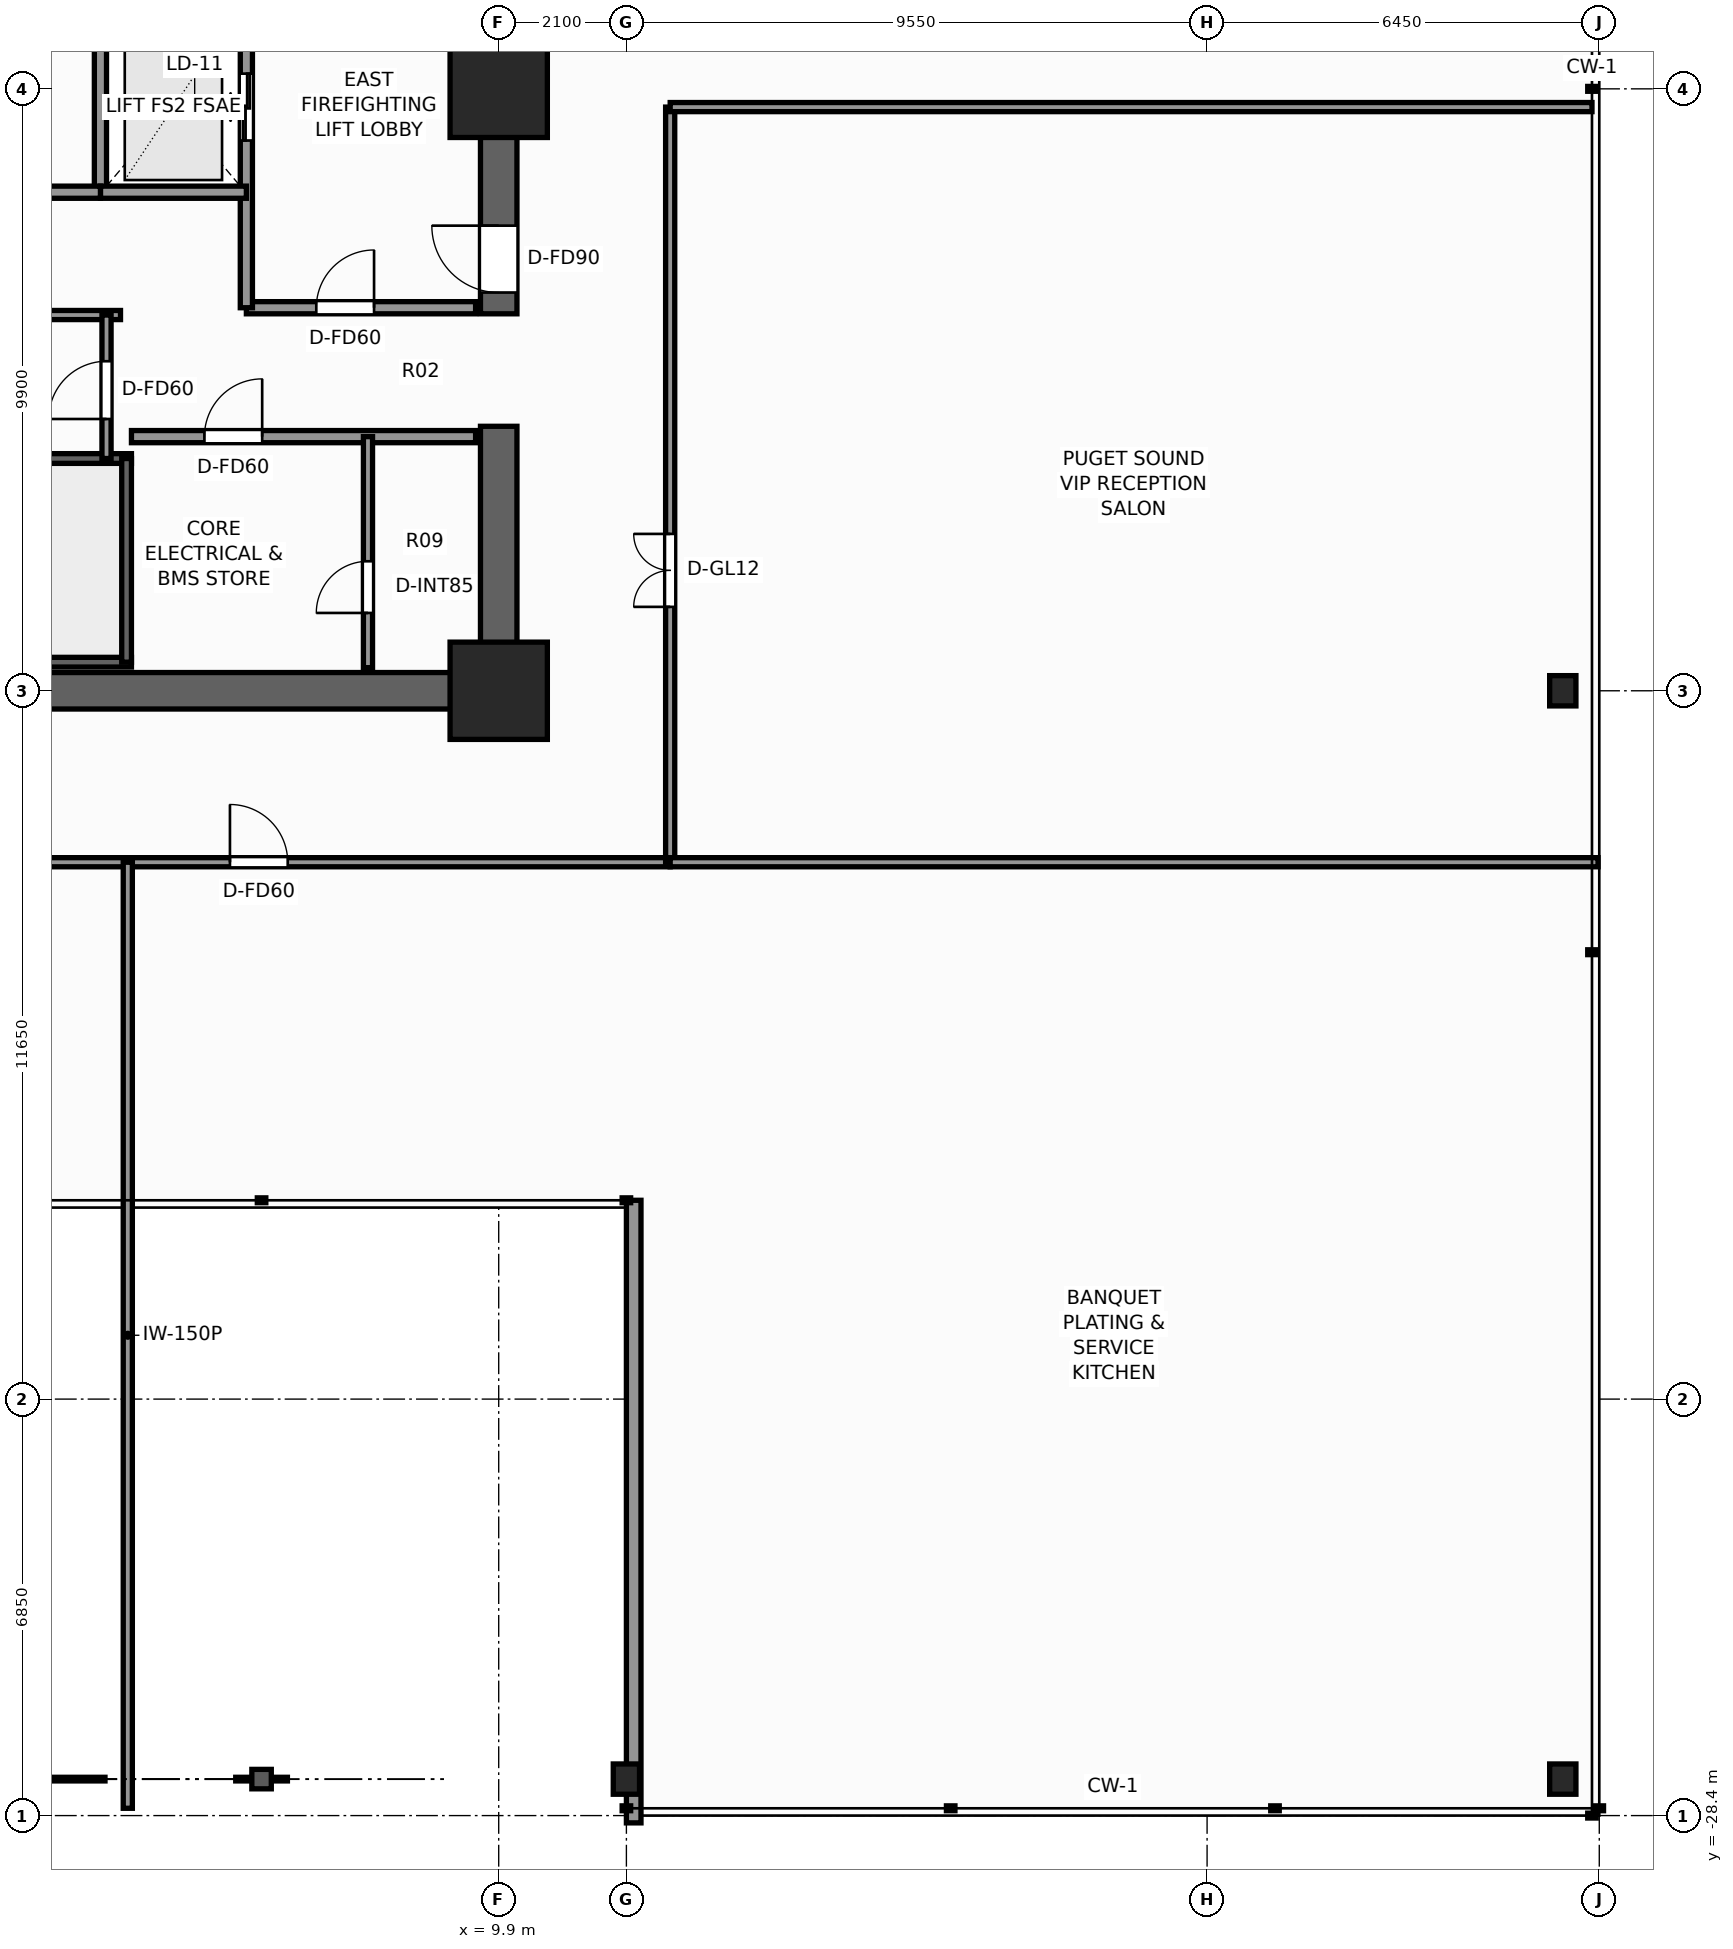
"""IFC4 building model, lengths in metres.
Left out: names, types, materials, properties, quantities, classifications, styles, units other than length and angle.
Written with IfcOpenShell. Run it as: python <this file> out.ifc"""

import sys

from ifc_helpers import new_model, si_unit, direction, frame, frame_2d, origin, origin_2d, place, context, subcontext, project, spatial, rectangle, i_section, extrude, element, fill, save


model = new_model("IFC4")
c1 = context("Model", 3, precision=1e-05, world=origin(), true_north=direction((0.0, 1.0)))
c2 = subcontext(c1, "Body", "Model", "MODEL_VIEW")
j1 = project(units=[si_unit("LENGTHUNIT", "METRE"), si_unit("PLANEANGLEUNIT", "RADIAN")], contexts=[c1])
p1 = place(None, origin())
s1 = spatial("IfcSite", under=j1, at=p1, CompositionType="ELEMENT")
p2 = place(p1, origin())
s2 = spatial("IfcBuilding", under=s1, at=p2, CompositionType="ELEMENT")
p3 = place(p2, frame((0.0, 0.0, 10.0)))
s3 = spatial("IfcBuildingStorey", under=s2, at=p3, CompositionType="ELEMENT", Elevation=10.0)
p4 = place(p3, frame((10.2, -9.9, 0.0), z_axis=(0.0, 0.0, 1.0), x_axis=(-1.0, 0.0, 0.0)))
e1 = element("IfcWall", 1, at=p4, inside=s3, PredefinedType="SHEAR", context=c2, shape_type="SweptSolid", body=[
    extrude(rectangle(XDim=12.06, YDim=0.6, at=frame_2d((6.03, 0.0))), origin(), (0.0, 0.0, 1.0), 5.2),
])
p5 = place(p3, frame((9.9, -9.6, 0.0), z_axis=(0.0, 0.0, 1.0), x_axis=(0.0, 1.0, 0.0)))
e2 = element("IfcWall", 2, at=p5, inside=s3, PredefinedType="SHEAR", context=c2, shape_type="SweptSolid", body=[
    extrude(rectangle(XDim=4.05, YDim=0.6, at=frame_2d((2.025, 0.0))), origin(), (0.0, 0.0, 1.0), 5.2),
])
p6 = place(p3, frame((9.9, -3.7, 0.0), z_axis=(0.0, 0.0, 1.0), x_axis=(0.0, 1.0, 0.0)))
e3 = element("IfcWall", 3, at=p6, inside=s3, PredefinedType="SHEAR", context=c2, shape_type="SweptSolid", body=[
    extrude(rectangle(XDim=13.3, YDim=0.6, at=frame_2d((6.65, 0.0))), origin(), (0.0, 0.0, 1.0), 5.2),
])
p7 = place(p6, frame((0.35, 0.0, 0.0)))
e4 = element("IfcOpeningElement", 4, at=p7, cuts=e3, PredefinedType="OPENING", context=c2, shape_type="SweptSolid", body=[
    extrude(rectangle(XDim=1.1, YDim=2.2, at=frame_2d((0.55, 1.1))), frame((0.0, 0.31, 0.0), z_axis=(0.0, -1.0, 0.0), x_axis=(1.0, 0.0, 0.0)), (0.0, 0.0, 1.0), 0.62),
])
for number, where, z_axis, x_axis in (
    (5, (9.9, -9.9, 0.0), (0.0, 0.0, 1.0), (1.0, 0.0, 0.0)),
    (6, (9.9, 0.0, 0.0), (0.0, 0.0, 1.0), (1.0, 0.0, 0.0)),
):
    element("IfcColumn", number, at=place(p3, frame(where, z_axis=z_axis, x_axis=x_axis)), inside=s3, PredefinedType="COLUMN", context=c2, shape_type="SweptSolid", body=[
        extrude(rectangle(XDim=1.6, YDim=1.6, at=origin_2d()), origin(), (0.0, 0.0, 1.0), 5.2),
    ])
for number, where, z_axis, x_axis in (
    (7, (12.0, -27.8, 0.0), (0.0, 0.0, 1.0), (1.0, 0.0, 0.0)),
    (8, (27.4, -27.8, 0.0), (0.0, 0.0, 1.0), (1.0, 0.0, 0.0)),
    (9, (27.4, -9.9, 0.0), (0.0, 0.0, 1.0), (1.0, 0.0, 0.0)),
):
    element("IfcColumn", number, at=place(p3, frame(where, z_axis=z_axis, x_axis=x_axis)), inside=s3, PredefinedType="COLUMN", context=c2, shape_type="SweptSolid", body=[
        extrude(i_section(OverallWidth=0.432, OverallDepth=0.498, WebThickness=0.056, FlangeThickness=0.089, FilletRadius=0.025, at=origin_2d()), origin(), (0.0, 0.0, 1.0), 5.2),
    ])
p8 = place(p3, frame((12.12, -28.52, 0.0), z_axis=(0.0, 0.0, 1.0), x_axis=(0.0, 1.0, 0.0)))
e10 = element("IfcWall", 10, at=p8, inside=s3, PredefinedType="STANDARD", context=c2, shape_type="SweptSolid", body=[
    extrude(rectangle(XDim=10.24, YDim=0.24, at=frame_2d((5.12, 0.0))), origin(), (0.0, 0.0, 1.0), 3.904),
])
p9 = place(p3, frame((3.86, -9.43, 0.0), z_axis=(0.0, 0.0, 1.0), x_axis=(-1.0, 0.0, 0.0)))
e11 = element("IfcWall", 11, at=p9, inside=s3, PredefinedType="SHEAR", context=c2, shape_type="SweptSolid", body=[
    extrude(rectangle(XDim=7.72, YDim=0.16, at=frame_2d((3.86, 0.0))), origin(), (0.0, 0.0, 1.0), 5.2),
])
p10 = place(p9, frame((6.01, 0.0, 0.0)))
e12 = element("IfcOpeningElement", 12, at=p10, cuts=e11, PredefinedType="OPENING", context=c2, shape_type="SweptSolid", body=[
    extrude(rectangle(XDim=1.1, YDim=2.2, at=frame_2d((0.55, 1.1))), frame((0.0, 0.09, 0.0), z_axis=(0.0, -1.0, 0.0), x_axis=(1.0, 0.0, 0.0)), (0.0, 0.0, 1.0), 0.18),
])
p11 = place(p3, frame((-3.86, -6.08, 0.0), z_axis=(0.0, 0.0, 1.0), x_axis=(1.0, 0.0, 0.0)))
e13 = element("IfcWall", 13, at=p11, inside=s3, PredefinedType="SHEAR", context=c2, shape_type="SweptSolid", body=[
    extrude(rectangle(XDim=7.72, YDim=0.16, at=frame_2d((3.86, 0.0))), origin(), (0.0, 0.0, 1.0), 5.2),
])
p12 = place(p3, frame((3.78, -9.43, 0.0), z_axis=(0.0, 0.0, 1.0), x_axis=(0.0, 1.0, 0.0)))
e14 = element("IfcWall", 14, at=p12, inside=s3, PredefinedType="SHEAR", context=c2, shape_type="SweptSolid", body=[
    extrude(rectangle(XDim=3.35, YDim=0.16, at=frame_2d((1.675, 0.0))), origin(), (0.0, 0.0, 1.0), 5.2),
])
p13 = place(p3, frame((5.75, -3.6, 0.0), z_axis=(0.0, 0.0, 1.0), x_axis=(1.0, 0.0, 0.0)))
e15 = element("IfcWall", 15, at=p13, inside=s3, PredefinedType="SOLIDWALL", context=c2, shape_type="SweptSolid", body=[
    extrude(rectangle(XDim=3.77, YDim=0.2, at=frame_2d((1.885, 0.0))), origin(), (0.0, 0.0, 1.0), 4.92),
])
p14 = place(p13, frame((1.15, 0.0, 0.0)))
e16 = element("IfcOpeningElement", 16, at=p14, cuts=e15, PredefinedType="OPENING", context=c2, shape_type="SweptSolid", body=[
    extrude(rectangle(XDim=0.95, YDim=2.06, at=frame_2d((0.475, 1.03))), frame((0.0, 0.11, 0.0), z_axis=(0.0, -1.0, 0.0), x_axis=(1.0, 0.0, 0.0)), (0.0, 0.0, 1.0), 0.22),
])
p15 = place(p3, frame((5.75, -3.6, 0.0), z_axis=(0.0, 0.0, 1.0), x_axis=(0.0, 1.0, 0.0)))
e17 = element("IfcWall", 17, at=p15, inside=s3, PredefinedType="SOLIDWALL", context=c2, shape_type="SweptSolid", body=[
    extrude(rectangle(XDim=5.57, YDim=0.2, at=frame_2d((2.785, 0.0))), origin(), (0.0, 0.0, 1.0), 4.92),
])
p16 = place(p15, frame((2.75, 0.0, 0.0)))
e18 = element("IfcOpeningElement", 18, at=p16, cuts=e17, PredefinedType="OPENING", context=c2, shape_type="SweptSolid", body=[
    extrude(rectangle(XDim=1.1, YDim=2.2, at=frame_2d((0.55, 1.1))), frame((0.0, 0.11, 0.0), z_axis=(0.0, -1.0, 0.0), x_axis=(1.0, 0.0, 0.0)), (0.0, 0.0, 1.0), 0.22),
])
p17 = place(p3, frame((3.35, -1.7, 0.0), z_axis=(0.0, 0.0, 1.0), x_axis=(0.0, 1.0, 0.0)))
e19 = element("IfcWall", 19, at=p17, inside=s3, PredefinedType="SOLIDWALL", context=c2, shape_type="SweptSolid", body=[
    extrude(rectangle(XDim=2.8, YDim=0.2, at=frame_2d((1.4, 0.0))), origin(), (0.0, 0.0, 1.0), 4.92),
])
p18 = place(p3, frame((3.35, -1.7, 0.0), z_axis=(0.0, 0.0, 1.0), x_axis=(1.0, 0.0, 0.0)))
e20 = element("IfcWall", 20, at=p18, inside=s3, PredefinedType="SOLIDWALL", context=c2, shape_type="SweptSolid", body=[
    extrude(rectangle(XDim=2.4, YDim=0.2, at=frame_2d((1.2, 0.0))), origin(), (0.0, 0.0, 1.0), 4.92),
])
p19 = place(p3, frame((3.86, -5.72, 0.0), z_axis=(0.0, 0.0, 1.0), x_axis=(1.0, 0.0, 0.0)))
e21 = element("IfcWall", 21, at=p19, inside=s3, PredefinedType="SOLIDWALL", context=c2, shape_type="SweptSolid", body=[
    extrude(rectangle(XDim=5.66, YDim=0.2, at=frame_2d((2.83, 0.0))), origin(), (0.0, 0.0, 1.0), 4.92),
])
p20 = place(p19, frame((1.2, 0.0, 0.0)))
e22 = element("IfcOpeningElement", 22, at=p20, cuts=e21, PredefinedType="OPENING", context=c2, shape_type="SweptSolid", body=[
    extrude(rectangle(XDim=0.95, YDim=2.06, at=frame_2d((0.475, 1.03))), frame((0.0, 0.11, 0.0), z_axis=(0.0, -1.0, 0.0), x_axis=(1.0, 0.0, 0.0)), (0.0, 0.0, 1.0), 0.22),
])
p21 = place(p3, frame((7.75, -9.52, 0.0), z_axis=(0.0, 0.0, 1.0), x_axis=(0.0, 1.0, 0.0)))
e23 = element("IfcWall", 23, at=p21, inside=s3, PredefinedType="PARTITIONING", context=c2, shape_type="SweptSolid", body=[
    extrude(rectangle(XDim=3.8, YDim=0.15, at=frame_2d((1.9, 0.0))), origin(), (0.0, 0.0, 1.0), 4.92),
])
p22 = place(p21, frame((0.9, 0.0, 0.0)))
e24 = element("IfcOpeningElement", 24, at=p22, cuts=e23, PredefinedType="OPENING", context=c2, shape_type="SweptSolid", body=[
    extrude(rectangle(XDim=0.85, YDim=2.03, at=frame_2d((0.425, 1.015))), frame((0.0, 0.085, 0.0), z_axis=(0.0, -1.0, 0.0), x_axis=(1.0, 0.0, 0.0)), (0.0, 0.0, 1.0), 0.17),
])
p23 = place(p3, frame((-3.35, -1.7, 0.0), z_axis=(0.0, 0.0, 1.0), x_axis=(1.0, 0.0, 0.0)))
e25 = element("IfcWall", 25, at=p23, inside=s3, PredefinedType="SOLIDWALL", context=c2, shape_type="SweptSolid", body=[
    extrude(rectangle(XDim=6.7, YDim=0.2, at=frame_2d((3.35, 0.0))), origin(), (0.0, 0.0, 1.0), 4.92),
])
p24 = place(p3, frame((-3.68, -3.72, 0.0), z_axis=(0.0, 0.0, 1.0), x_axis=(1.0, 0.0, 0.0)))
e26 = element("IfcWall", 26, at=p24, inside=s3, PredefinedType="PARTITIONING", context=c2, shape_type="SweptSolid", body=[
    extrude(rectangle(XDim=7.36, YDim=0.15, at=frame_2d((3.68, 0.0))), origin(), (0.0, 0.0, 1.0), 4.92),
])
p25 = place(p3, frame((3.45, -6.08, 0.0), z_axis=(0.0, 0.0, 1.0), x_axis=(0.0, 1.0, 0.0)))
e27 = element("IfcWall", 27, at=p25, inside=s3, PredefinedType="PARTITIONING", context=c2, shape_type="SweptSolid", body=[
    extrude(rectangle(XDim=2.36, YDim=0.15, at=frame_2d((1.18, 0.0))), origin(), (0.0, 0.0, 1.0), 4.92),
])
p26 = place(p25, frame((0.65, 0.0, 0.0)))
e28 = element("IfcOpeningElement", 28, at=p26, cuts=e27, PredefinedType="OPENING", context=c2, shape_type="SweptSolid", body=[
    extrude(rectangle(XDim=0.95, YDim=2.06, at=frame_2d((0.475, 1.03))), frame((0.0, 0.085, 0.0), z_axis=(0.0, -1.0, 0.0), x_axis=(1.0, 0.0, 0.0)), (0.0, 0.0, 1.0), 0.17),
])
p27 = place(p3, frame((-12.72, -12.72, 0.0), z_axis=(0.0, 0.0, 1.0), x_axis=(1.0, 0.0, 0.0)))
e29 = element("IfcWall", 29, at=p27, inside=s3, PredefinedType="PARTITIONING", context=c2, shape_type="SweptSolid", body=[
    extrude(rectangle(XDim=25.44, YDim=0.15, at=frame_2d((12.72, 0.0))), origin(), (0.0, 0.0, 1.0), 3.894),
])
p28 = place(p27, frame((4.2, 0.0, 0.0)))
e30 = element("IfcOpeningElement", 30, at=p28, cuts=e29, PredefinedType="OPENING", context=c2, shape_type="SweptSolid", body=[
    extrude(rectangle(XDim=1.6, YDim=2.3, at=frame_2d((0.8, 1.15))), frame((0.0, 0.085, 0.0), z_axis=(0.0, -1.0, 0.0), x_axis=(1.0, 0.0, 0.0)), (0.0, 0.0, 1.0), 0.17),
])
p29 = place(p27, frame((18.2, 0.0, 0.0)))
e31 = element("IfcOpeningElement", 31, at=p29, cuts=e29, PredefinedType="OPENING", context=c2, shape_type="SweptSolid", body=[
    extrude(rectangle(XDim=0.95, YDim=2.06, at=frame_2d((0.475, 1.03))), frame((0.0, 0.085, 0.0), z_axis=(0.0, -1.0, 0.0), x_axis=(1.0, 0.0, 0.0)), (0.0, 0.0, 1.0), 0.17),
])
p30 = place(p3, frame((12.72, -12.72, 0.0), z_axis=(0.0, 0.0, 1.0), x_axis=(0.0, 1.0, 0.0)))
e32 = element("IfcWall", 32, at=p30, inside=s3, PredefinedType="PARTITIONING", context=c2, shape_type="SweptSolid", body=[
    extrude(rectangle(XDim=12.42, YDim=0.15, at=frame_2d((6.21, 0.0))), origin(), (0.0, 0.0, 1.0), 3.894),
])
p31 = place(p30, frame((4.2, 0.0, 0.0)))
e33 = element("IfcOpeningElement", 33, at=p31, cuts=e32, PredefinedType="OPENING", context=c2, shape_type="SweptSolid", body=[
    extrude(rectangle(XDim=1.2, YDim=2.2, at=frame_2d((0.6, 1.1))), frame((0.0, 0.085, 0.0), z_axis=(0.0, -1.0, 0.0), x_axis=(1.0, 0.0, 0.0)), (0.0, 0.0, 1.0), 0.17),
])
p32 = place(p3, frame((12.72, -0.3, 0.0), z_axis=(0.0, 0.0, 1.0), x_axis=(1.0, 0.0, 0.0)))
e34 = element("IfcWall", 34, at=p32, inside=s3, PredefinedType="PARTITIONING", context=c2, shape_type="SweptSolid", body=[
    extrude(rectangle(XDim=15.16, YDim=0.15, at=frame_2d((7.58, 0.0))), origin(), (0.0, 0.0, 1.0), 4.289),
])
p33 = place(p3, frame((12.72, -12.72, 0.0), z_axis=(0.0, 0.0, 1.0), x_axis=(1.0, 0.0, 0.0)))
e35 = element("IfcWall", 35, at=p33, inside=s3, PredefinedType="PARTITIONING", context=c2, shape_type="SweptSolid", body=[
    extrude(rectangle(XDim=15.26, YDim=0.15, at=frame_2d((7.63, 0.0))), origin(), (0.0, 0.0, 1.0), 4.289),
])
p34 = place(p3, frame((3.8, -28.28, 0.0), z_axis=(0.0, 0.0, 1.0), x_axis=(0.0, 1.0, 0.0)))
e36 = element("IfcWall", 36, at=p34, inside=s3, PredefinedType="PARTITIONING", context=c2, shape_type="SweptSolid", body=[
    extrude(rectangle(XDim=15.56, YDim=0.15, at=frame_2d((7.78, 0.0))), origin(), (0.0, 0.0, 1.0), 3.957),
])
p35 = place(p7, origin())
e37 = element("IfcDoor", 37, at=p35, inside=s3, OperationType="SINGLE_SWING_RIGHT", PredefinedType="DOOR", context=c2, shape_type="SweptSolid", body=[
    extrude(rectangle(XDim=1.1, YDim=2.2, at=frame_2d((0.55, 1.1))), frame((0.0, 0.025, 0.0), z_axis=(0.0, -1.0, 0.0), x_axis=(1.0, 0.0, 0.0)), (0.0, 0.0, 1.0), 0.05),
])
fill(e4, e37)
p36 = place(p16, origin())
e38 = element("IfcDoor", 38, at=p36, inside=s3, OperationType="DOUBLE_DOOR_SLIDING", PredefinedType="DOOR", context=c2, shape_type="SweptSolid", body=[
    extrude(rectangle(XDim=1.1, YDim=2.2, at=frame_2d((0.55, 1.1))), frame((0.0, 0.025, 0.0), z_axis=(0.0, -1.0, 0.0), x_axis=(1.0, 0.0, 0.0)), (0.0, 0.0, 1.0), 0.05),
])
fill(e18, e38)
p37 = place(p20, origin())
e39 = element("IfcDoor", 39, at=p37, inside=s3, OperationType="SINGLE_SWING_RIGHT", PredefinedType="DOOR", context=c2, shape_type="SweptSolid", body=[
    extrude(rectangle(XDim=0.95, YDim=2.06, at=frame_2d((0.475, 1.03))), frame((0.0, 0.025, 0.0), z_axis=(0.0, -1.0, 0.0), x_axis=(1.0, 0.0, 0.0)), (0.0, 0.0, 1.0), 0.05),
])
fill(e22, e39)
p38 = place(p22, origin())
e40 = element("IfcDoor", 40, at=p38, inside=s3, OperationType="SINGLE_SWING_LEFT", PredefinedType="DOOR", context=c2, shape_type="SweptSolid", body=[
    extrude(rectangle(XDim=0.85, YDim=2.03, at=frame_2d((0.425, 1.015))), frame((0.0, 0.025, 0.0), z_axis=(0.0, -1.0, 0.0), x_axis=(1.0, 0.0, 0.0)), (0.0, 0.0, 1.0), 0.05),
])
fill(e24, e40)
p39 = place(p14, origin())
e41 = element("IfcDoor", 41, at=p39, inside=s3, OperationType="SINGLE_SWING_RIGHT", PredefinedType="DOOR", context=c2, shape_type="SweptSolid", body=[
    extrude(rectangle(XDim=0.95, YDim=2.06, at=frame_2d((0.475, 1.03))), frame((0.0, 0.025, 0.0), z_axis=(0.0, -1.0, 0.0), x_axis=(1.0, 0.0, 0.0)), (0.0, 0.0, 1.0), 0.05),
])
fill(e16, e41)
p40 = place(p26, origin())
e42 = element("IfcDoor", 42, at=p40, inside=s3, OperationType="SINGLE_SWING_LEFT", PredefinedType="DOOR", context=c2, shape_type="SweptSolid", body=[
    extrude(rectangle(XDim=0.95, YDim=2.06, at=frame_2d((0.475, 1.03))), frame((0.0, 0.025, 0.0), z_axis=(0.0, -1.0, 0.0), x_axis=(1.0, 0.0, 0.0)), (0.0, 0.0, 1.0), 0.05),
])
fill(e28, e42)
p41 = place(p29, origin())
e43 = element("IfcDoor", 43, at=p41, inside=s3, OperationType="SINGLE_SWING_LEFT", PredefinedType="DOOR", context=c2, shape_type="SweptSolid", body=[
    extrude(rectangle(XDim=0.95, YDim=2.06, at=frame_2d((0.475, 1.03))), frame((0.0, 0.025, 0.0), z_axis=(0.0, -1.0, 0.0), x_axis=(1.0, 0.0, 0.0)), (0.0, 0.0, 1.0), 0.05),
])
fill(e31, e43)
p42 = place(p31, origin())
e44 = element("IfcDoor", 44, at=p42, inside=s3, OperationType="DOUBLE_DOOR_SINGLE_SWING", PredefinedType="DOOR", context=c2, shape_type="SweptSolid", body=[
    extrude(rectangle(XDim=1.2, YDim=2.2, at=frame_2d((0.6, 1.1))), frame((0.0, 0.025, 0.0), z_axis=(0.0, -1.0, 0.0), x_axis=(1.0, 0.0, 0.0)), (0.0, 0.0, 1.0), 0.05),
])
fill(e33, e44)
save(model, sys.argv[1])
